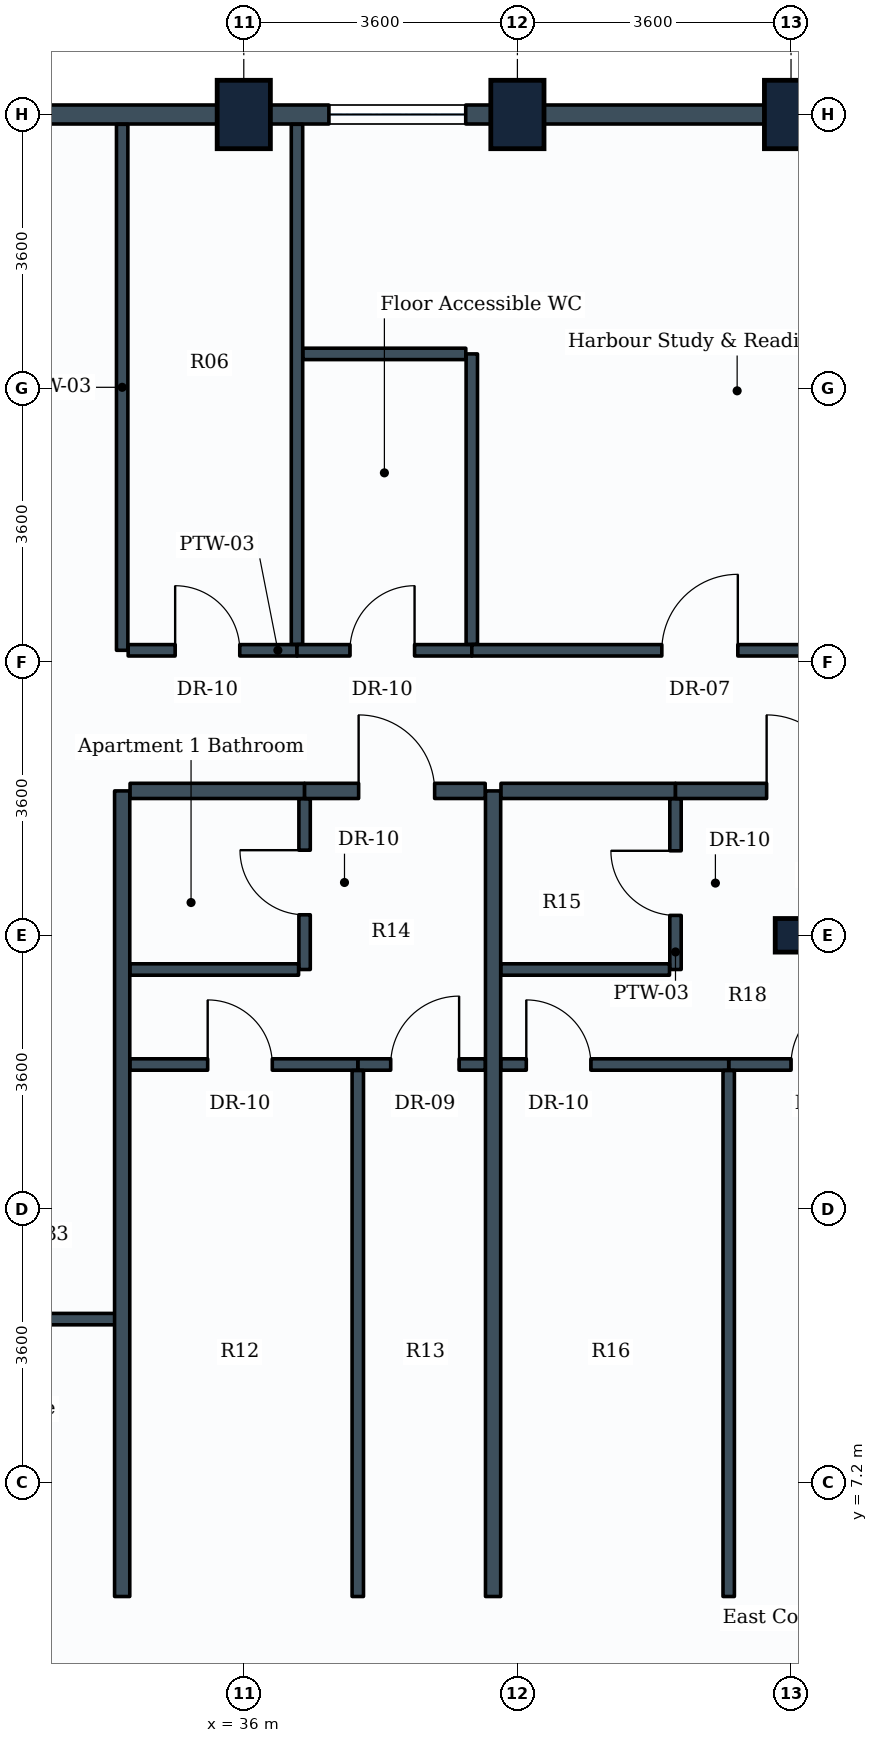
"""IFC4 building model, lengths in metres.
Left out: names, types, materials, properties, quantities, classifications, styles, units other than length and angle.
Written with IfcOpenShell. Run it as: python <this file> out.ifc"""

import sys

from ifc_helpers import new_model, si_unit, direction, frame, frame_2d, origin, origin_2d, place, context, subcontext, project, spatial, rectangle, i_section, extrude, element, fill, save


model = new_model("IFC4")
c1 = context("Model", 3, precision=1e-05, world=origin(), true_north=direction((0.0, 1.0)))
c2 = subcontext(c1, "Body", "Model", "MODEL_VIEW")
j1 = project(units=[si_unit("LENGTHUNIT", "METRE"), si_unit("PLANEANGLEUNIT", "RADIAN")], contexts=[c1])
p1 = place(None, origin())
s1 = spatial("IfcSite", under=j1, at=p1, CompositionType="ELEMENT")
p2 = place(p1, origin())
s2 = spatial("IfcBuilding", under=s1, at=p2, CompositionType="ELEMENT")
p3 = place(p2, frame((0.0, 0.0, 174.8)))
s3 = spatial("IfcBuildingStorey", under=s2, at=p3, CompositionType="ELEMENT", Elevation=174.8)
for number, where, z_axis, x_axis in (
    (1, (36.0, 25.2, 0.0), (0.0, 0.0, 1.0), (1.0, 0.0, 0.0)),
    (2, (39.6, 25.2, 0.0), (0.0, 0.0, 1.0), (1.0, 0.0, 0.0)),
):
    element("IfcColumn", number, at=place(p3, frame(where, z_axis=z_axis, x_axis=x_axis)), inside=s3, PredefinedType="COLUMN", context=c2, shape_type="SweptSolid", body=[
        extrude(rectangle(XDim=0.7, YDim=0.9, at=origin_2d()), origin(), (0.0, 0.0, 1.0), 3.8),
    ])
p4 = place(p3, frame((43.2, 14.4, 0.0), z_axis=(0.0, 0.0, 1.0), x_axis=(1.0, 0.0, 0.0)))
e3 = element("IfcColumn", 3, at=p4, inside=s3, PredefinedType="COLUMN", context=c2, shape_type="SweptSolid", body=[
    extrude(i_section(OverallWidth=0.416, OverallDepth=0.442, WebThickness=0.025, FlangeThickness=0.041, FilletRadius=0.015, at=origin_2d()), origin(), (0.0, 0.0, 1.0), 3.8),
])
p5 = place(p3, frame((43.2, 25.2, 0.0), z_axis=(0.0, 0.0, 1.0), x_axis=(1.0, 0.0, 0.0)))
e4 = element("IfcColumn", 4, at=p5, inside=s3, PredefinedType="COLUMN", context=c2, shape_type="SweptSolid", body=[
    extrude(rectangle(XDim=0.7, YDim=0.9, at=origin_2d()), origin(), (0.0, 0.0, 1.0), 3.8),
])
p6 = place(p3, frame((43.2, 25.2, 0.0), z_axis=(0.0, 0.0, 1.0), x_axis=(1.0, 0.0, 0.0)))
e5 = element("IfcWall", 5, at=p6, inside=s3, PredefinedType="STANDARD", context=c2, shape_type="SweptSolid", body=[
    extrude(rectangle(XDim=3.6, YDim=0.25, at=frame_2d((1.8, 0.0))), origin(), (0.0, 0.0, 1.0), 2.93),
])
p7 = place(p3, frame((39.6, 25.2, 0.0), z_axis=(0.0, 0.0, 1.0), x_axis=(1.0, 0.0, 0.0)))
e6 = element("IfcWall", 6, at=p7, inside=s3, PredefinedType="STANDARD", context=c2, shape_type="SweptSolid", body=[
    extrude(rectangle(XDim=3.6, YDim=0.25, at=frame_2d((1.8, 0.0))), origin(), (0.0, 0.0, 1.0), 2.93),
])
p8 = place(p3, frame((36.0, 25.2, 0.0), z_axis=(0.0, 0.0, 1.0), x_axis=(1.0, 0.0, 0.0)))
e7 = element("IfcWall", 7, at=p8, inside=s3, PredefinedType="STANDARD", context=c2, shape_type="SweptSolid", body=[
    extrude(rectangle(XDim=3.6, YDim=0.25, at=frame_2d((1.8, 0.0))), origin(), (0.0, 0.0, 1.0), 2.93),
])
p9 = place(p8, frame((1.12, 0.0, 0.85)))
e8 = element("IfcOpeningElement", 8, at=p9, cuts=e7, PredefinedType="OPENING", context=c2, shape_type="SweptSolid", body=[
    extrude(rectangle(XDim=1.8, YDim=1.35, at=frame_2d((0.9, 0.675))), frame((0.0, 0.135, 0.0), z_axis=(0.0, -1.0, 0.0), x_axis=(1.0, 0.0, 0.0)), (0.0, 0.0, 1.0), 0.27),
])
p10 = place(p3, frame((32.4, 25.2, 0.0), z_axis=(0.0, 0.0, 1.0), x_axis=(1.0, 0.0, 0.0)))
e9 = element("IfcWall", 9, at=p10, inside=s3, PredefinedType="STANDARD", context=c2, shape_type="SweptSolid", body=[
    extrude(rectangle(XDim=3.6, YDim=0.25, at=frame_2d((1.8, 0.0))), origin(), (0.0, 0.0, 1.0), 2.93),
])
p11 = place(p3, frame((34.4, 18.15, 0.0), z_axis=(0.0, 0.0, 1.0), x_axis=(0.0, 1.0, 0.0)))
e10 = element("IfcWall", 10, at=p11, inside=s3, PredefinedType="PARTITIONING", context=c2, shape_type="SweptSolid", body=[
    extrude(rectangle(XDim=6.921, YDim=0.15, at=frame_2d((3.46, 0.0))), origin(), (0.0, 0.0, 1.0), 2.93),
])
p12 = place(p3, frame((34.479, 18.15, 0.0), z_axis=(0.0, 0.0, 1.0), x_axis=(1.0, 0.0, 0.0)))
e11 = element("IfcWall", 11, at=p12, inside=s3, PredefinedType="PARTITIONING", context=c2, shape_type="SweptSolid", body=[
    extrude(rectangle(XDim=2.221, YDim=0.15, at=frame_2d((1.11, 0.0))), origin(), (0.0, 0.0, 1.0), 3.2),
])
p13 = place(p12, frame((0.618, 0.0, 0.0)))
e12 = element("IfcOpeningElement", 12, at=p13, cuts=e11, PredefinedType="OPENING", context=c2, shape_type="SweptSolid", body=[
    extrude(rectangle(XDim=0.85, YDim=2.1, at=frame_2d((0.425, 1.05))), frame((0.0, 0.085, 0.0), z_axis=(0.0, -1.0, 0.0), x_axis=(1.0, 0.0, 0.0)), (0.0, 0.0, 1.0), 0.17),
])
p14 = place(p3, frame((36.7, 18.229, 0.0), z_axis=(0.0, 0.0, 1.0), x_axis=(0.0, 1.0, 0.0)))
e13 = element("IfcWall", 13, at=p14, inside=s3, PredefinedType="PARTITIONING", context=c2, shape_type="SweptSolid", body=[
    extrude(rectangle(XDim=6.842, YDim=0.15, at=frame_2d((3.421, 0.0))), origin(), (0.0, 0.0, 1.0), 2.93),
])
p15 = place(p3, frame((36.7, 18.15, 0.0), z_axis=(0.0, 0.0, 1.0), x_axis=(1.0, 0.0, 0.0)))
e14 = element("IfcWall", 14, at=p15, inside=s3, PredefinedType="PARTITIONING", context=c2, shape_type="SweptSolid", body=[
    extrude(rectangle(XDim=2.3, YDim=0.15, at=frame_2d((1.15, 0.0))), origin(), (0.0, 0.0, 1.0), 3.2),
])
p16 = place(p15, frame((0.697, 0.0, 0.0)))
e15 = element("IfcOpeningElement", 15, at=p16, cuts=e14, PredefinedType="OPENING", context=c2, shape_type="SweptSolid", body=[
    extrude(rectangle(XDim=0.85, YDim=2.1, at=frame_2d((0.425, 1.05))), frame((0.0, 0.085, 0.0), z_axis=(0.0, -1.0, 0.0), x_axis=(1.0, 0.0, 0.0)), (0.0, 0.0, 1.0), 0.17),
])
p17 = place(p3, frame((39.0, 18.229, 0.0), z_axis=(0.0, 0.0, 1.0), x_axis=(0.0, 1.0, 0.0)))
e16 = element("IfcWall", 16, at=p17, inside=s3, PredefinedType="PARTITIONING", context=c2, shape_type="SweptSolid", body=[
    extrude(rectangle(XDim=3.821, YDim=0.15, at=frame_2d((1.911, 0.0))), origin(), (0.0, 0.0, 1.0), 3.17),
])
p18 = place(p3, frame((36.779, 22.05, 0.0), z_axis=(0.0, 0.0, 1.0), x_axis=(1.0, 0.0, 0.0)))
e17 = element("IfcWall", 17, at=p18, inside=s3, PredefinedType="PARTITIONING", context=c2, shape_type="SweptSolid", body=[
    extrude(rectangle(XDim=2.142, YDim=0.15, at=frame_2d((1.071, 0.0))), origin(), (0.0, 0.0, 1.0), 3.535),
])
p19 = place(p3, frame((28.879, 9.35, 0.0), z_axis=(0.0, 0.0, 1.0), x_axis=(1.0, 0.0, 0.0)))
e18 = element("IfcWall", 18, at=p19, inside=s3, PredefinedType="PARTITIONING", context=c2, shape_type="SweptSolid", body=[
    extrude(rectangle(XDim=5.521, YDim=0.15, at=frame_2d((2.76, 0.0))), origin(), (0.0, 0.0, 1.0), 3.535),
])
p20 = place(p19, frame((0.36, 0.0, 0.0)))
e19 = element("IfcOpeningElement", 19, at=p20, cuts=e18, PredefinedType="OPENING", context=c2, shape_type="SweptSolid", body=[
    extrude(rectangle(XDim=1.0, YDim=2.1, at=frame_2d((0.5, 1.05))), frame((0.0, 0.085, 0.0), z_axis=(0.0, -1.0, 0.0), x_axis=(1.0, 0.0, 0.0)), (0.0, 0.0, 1.0), 0.17),
])
for number, where, z_axis, x_axis in (
    (20, (34.4, 5.7, 0.0), (0.0, 0.0, 1.0), (0.0, 1.0, 0.0)),
    (21, (39.28, 5.7, 0.0), (0.0, 0.0, 1.0), (0.0, 1.0, 0.0)),
):
    element("IfcWall", number, at=place(p3, frame(where, z_axis=z_axis, x_axis=x_axis)), inside=s3, PredefinedType="PARTITIONING", context=c2, shape_type="SweptSolid", body=[
        extrude(rectangle(XDim=10.6, YDim=0.2, at=frame_2d((5.3, 0.0))), origin(), (0.0, 0.0, 1.0), 3.17),
    ])
p21 = place(p3, frame((34.504, 16.3, 0.0), z_axis=(0.0, 0.0, 1.0), x_axis=(1.0, 0.0, 0.0)))
e22 = element("IfcWall", 22, at=p21, inside=s3, PredefinedType="PARTITIONING", context=c2, shape_type="SweptSolid", body=[
    extrude(rectangle(XDim=2.296, YDim=0.2, at=frame_2d((1.148, 0.0))), origin(), (0.0, 0.0, 1.0), 3.22),
])
p22 = place(p3, frame((36.8, 13.95, 0.0), z_axis=(0.0, 0.0, 1.0), x_axis=(0.0, 1.0, 0.0)))
e23 = element("IfcWall", 23, at=p22, inside=s3, PredefinedType="PARTITIONING", context=c2, shape_type="SweptSolid", body=[
    extrude(rectangle(XDim=2.246, YDim=0.15, at=frame_2d((1.123, 0.0))), origin(), (0.0, 0.0, 1.0), 3.17),
])
p23 = place(p22, frame((0.72, 0.0, 0.0)))
e24 = element("IfcOpeningElement", 24, at=p23, cuts=e23, PredefinedType="OPENING", context=c2, shape_type="SweptSolid", body=[
    extrude(rectangle(XDim=0.85, YDim=2.1, at=frame_2d((0.425, 1.05))), frame((0.0, 0.085, 0.0), z_axis=(0.0, -1.0, 0.0), x_axis=(1.0, 0.0, 0.0)), (0.0, 0.0, 1.0), 0.17),
])
p24 = place(p3, frame((34.504, 13.95, 0.0), z_axis=(0.0, 0.0, 1.0), x_axis=(1.0, 0.0, 0.0)))
e25 = element("IfcWall", 25, at=p24, inside=s3, PredefinedType="PARTITIONING", context=c2, shape_type="SweptSolid", body=[
    extrude(rectangle(XDim=2.217, YDim=0.15, at=frame_2d((1.108, 0.0))), origin(), (0.0, 0.0, 1.0), 3.22),
])
p25 = place(p3, frame((36.8, 16.3, 0.0), z_axis=(0.0, 0.0, 1.0), x_axis=(1.0, 0.0, 0.0)))
e26 = element("IfcWall", 26, at=p25, inside=s3, PredefinedType="PARTITIONING", context=c2, shape_type="SweptSolid", body=[
    extrude(rectangle(XDim=2.376, YDim=0.2, at=frame_2d((1.188, 0.0))), origin(), (0.0, 0.0, 1.0), 3.535),
])
p26 = place(p25, frame((0.711, 0.0, 0.0)))
e27 = element("IfcOpeningElement", 27, at=p26, cuts=e26, PredefinedType="OPENING", context=c2, shape_type="SweptSolid", body=[
    extrude(rectangle(XDim=1.0, YDim=2.1, at=frame_2d((0.5, 1.05))), frame((0.0, 0.11, 0.0), z_axis=(0.0, -1.0, 0.0), x_axis=(1.0, 0.0, 0.0)), (0.0, 0.0, 1.0), 0.22),
])
p27 = place(p3, frame((37.5, 12.7, 0.0), z_axis=(0.0, 0.0, 1.0), x_axis=(1.0, 0.0, 0.0)))
e28 = element("IfcWall", 28, at=p27, inside=s3, PredefinedType="PARTITIONING", context=c2, shape_type="SweptSolid", body=[
    extrude(rectangle(XDim=1.676, YDim=0.15, at=frame_2d((0.838, 0.0))), origin(), (0.0, 0.0, 1.0), 3.535),
])
p28 = place(p27, frame((0.433, 0.0, 0.0)))
e29 = element("IfcOpeningElement", 29, at=p28, cuts=e28, PredefinedType="OPENING", context=c2, shape_type="SweptSolid", body=[
    extrude(rectangle(XDim=0.9, YDim=2.1, at=frame_2d((0.45, 1.05))), frame((0.0, 0.085, 0.0), z_axis=(0.0, -1.0, 0.0), x_axis=(1.0, 0.0, 0.0)), (0.0, 0.0, 1.0), 0.17),
])
p29 = place(p3, frame((34.504, 12.7, 0.0), z_axis=(0.0, 0.0, 1.0), x_axis=(1.0, 0.0, 0.0)))
e30 = element("IfcWall", 30, at=p29, inside=s3, PredefinedType="PARTITIONING", context=c2, shape_type="SweptSolid", body=[
    extrude(rectangle(XDim=2.996, YDim=0.15, at=frame_2d((1.498, 0.0))), origin(), (0.0, 0.0, 1.0), 3.22),
])
p30 = place(p29, frame((1.021, 0.0, 0.0)))
e31 = element("IfcOpeningElement", 31, at=p30, cuts=e30, PredefinedType="OPENING", context=c2, shape_type="SweptSolid", body=[
    extrude(rectangle(XDim=0.85, YDim=2.1, at=frame_2d((0.425, 1.05))), frame((0.0, 0.085, 0.0), z_axis=(0.0, -1.0, 0.0), x_axis=(1.0, 0.0, 0.0)), (0.0, 0.0, 1.0), 0.17),
])
p31 = place(p3, frame((37.5, 5.7, 0.0), z_axis=(0.0, 0.0, 1.0), x_axis=(0.0, 1.0, 0.0)))
e32 = element("IfcWall", 32, at=p31, inside=s3, PredefinedType="PARTITIONING", context=c2, shape_type="SweptSolid", body=[
    extrude(rectangle(XDim=6.921, YDim=0.15, at=frame_2d((3.46, 0.0))), origin(), (0.0, 0.0, 1.0), 3.17),
])
p32 = place(p3, frame((39.384, 16.3, 0.0), z_axis=(0.0, 0.0, 1.0), x_axis=(1.0, 0.0, 0.0)))
e33 = element("IfcWall", 33, at=p32, inside=s3, PredefinedType="PARTITIONING", context=c2, shape_type="SweptSolid", body=[
    extrude(rectangle(XDim=2.296, YDim=0.2, at=frame_2d((1.148, 0.0))), origin(), (0.0, 0.0, 1.0), 3.17),
])
p33 = place(p3, frame((41.68, 13.95, 0.0), z_axis=(0.0, 0.0, 1.0), x_axis=(0.0, 1.0, 0.0)))
e34 = element("IfcWall", 34, at=p33, inside=s3, PredefinedType="PARTITIONING", context=c2, shape_type="SweptSolid", body=[
    extrude(rectangle(XDim=2.246, YDim=0.15, at=frame_2d((1.123, 0.0))), origin(), (0.0, 0.0, 1.0), 3.17),
])
p34 = place(p33, frame((0.712, 0.0, 0.0)))
e35 = element("IfcOpeningElement", 35, at=p34, cuts=e34, PredefinedType="OPENING", context=c2, shape_type="SweptSolid", body=[
    extrude(rectangle(XDim=0.85, YDim=2.1, at=frame_2d((0.425, 1.05))), frame((0.0, 0.085, 0.0), z_axis=(0.0, -1.0, 0.0), x_axis=(1.0, 0.0, 0.0)), (0.0, 0.0, 1.0), 0.17),
])
p35 = place(p3, frame((39.384, 13.95, 0.0), z_axis=(0.0, 0.0, 1.0), x_axis=(1.0, 0.0, 0.0)))
e36 = element("IfcWall", 36, at=p35, inside=s3, PredefinedType="PARTITIONING", context=c2, shape_type="SweptSolid", body=[
    extrude(rectangle(XDim=2.217, YDim=0.15, at=frame_2d((1.108, 0.0))), origin(), (0.0, 0.0, 1.0), 3.17),
])
p36 = place(p3, frame((41.68, 16.3, 0.0), z_axis=(0.0, 0.0, 1.0), x_axis=(1.0, 0.0, 0.0)))
e37 = element("IfcWall", 37, at=p36, inside=s3, PredefinedType="PARTITIONING", context=c2, shape_type="SweptSolid", body=[
    extrude(rectangle(XDim=3.32, YDim=0.2, at=frame_2d((1.66, 0.0))), origin(), (0.0, 0.0, 1.0), 3.18),
])
p37 = place(p36, frame((1.199, 0.0, 0.0)))
e38 = element("IfcOpeningElement", 38, at=p37, cuts=e37, PredefinedType="OPENING", context=c2, shape_type="SweptSolid", body=[
    extrude(rectangle(XDim=1.0, YDim=2.1, at=frame_2d((0.5, 1.05))), frame((0.0, 0.11, 0.0), z_axis=(0.0, -1.0, 0.0), x_axis=(1.0, 0.0, 0.0)), (0.0, 0.0, 1.0), 0.22),
])
p38 = place(p3, frame((42.38, 12.7, 0.0), z_axis=(0.0, 0.0, 1.0), x_axis=(1.0, 0.0, 0.0)))
e39 = element("IfcWall", 39, at=p38, inside=s3, PredefinedType="PARTITIONING", context=c2, shape_type="SweptSolid", body=[
    extrude(rectangle(XDim=2.62, YDim=0.15, at=frame_2d((1.31, 0.0))), origin(), (0.0, 0.0, 1.0), 3.18),
])
p39 = place(p38, frame((0.82, 0.0, 0.0)))
e40 = element("IfcOpeningElement", 40, at=p39, cuts=e39, PredefinedType="OPENING", context=c2, shape_type="SweptSolid", body=[
    extrude(rectangle(XDim=0.9, YDim=2.1, at=frame_2d((0.45, 1.05))), frame((0.0, 0.085, 0.0), z_axis=(0.0, -1.0, 0.0), x_axis=(1.0, 0.0, 0.0)), (0.0, 0.0, 1.0), 0.17),
])
p40 = place(p3, frame((39.384, 12.7, 0.0), z_axis=(0.0, 0.0, 1.0), x_axis=(1.0, 0.0, 0.0)))
e41 = element("IfcWall", 41, at=p40, inside=s3, PredefinedType="PARTITIONING", context=c2, shape_type="SweptSolid", body=[
    extrude(rectangle(XDim=2.996, YDim=0.15, at=frame_2d((1.498, 0.0))), origin(), (0.0, 0.0, 1.0), 3.17),
])
p41 = place(p40, frame((0.333, 0.0, 0.0)))
e42 = element("IfcOpeningElement", 42, at=p41, cuts=e41, PredefinedType="OPENING", context=c2, shape_type="SweptSolid", body=[
    extrude(rectangle(XDim=0.85, YDim=2.1, at=frame_2d((0.425, 1.05))), frame((0.0, 0.085, 0.0), z_axis=(0.0, -1.0, 0.0), x_axis=(1.0, 0.0, 0.0)), (0.0, 0.0, 1.0), 0.17),
])
p42 = place(p3, frame((42.38, 5.7, 0.0), z_axis=(0.0, 0.0, 1.0), x_axis=(0.0, 1.0, 0.0)))
e43 = element("IfcWall", 43, at=p42, inside=s3, PredefinedType="PARTITIONING", context=c2, shape_type="SweptSolid", body=[
    extrude(rectangle(XDim=6.921, YDim=0.15, at=frame_2d((3.46, 0.0))), origin(), (0.0, 0.0, 1.0), 3.17),
])
p43 = place(p3, frame((39.0, 18.15, 0.0), z_axis=(0.0, 0.0, 1.0), x_axis=(1.0, 0.0, 0.0)))
e44 = element("IfcWall", 44, at=p43, inside=s3, PredefinedType="PARTITIONING", context=c2, shape_type="SweptSolid", body=[
    extrude(rectangle(XDim=6.0, YDim=0.15, at=frame_2d((3.0, 0.0))), origin(), (0.0, 0.0, 1.0), 3.17),
])
p44 = place(p43, frame((2.5, 0.0, 0.0)))
e45 = element("IfcOpeningElement", 45, at=p44, cuts=e44, PredefinedType="OPENING", context=c2, shape_type="SweptSolid", body=[
    extrude(rectangle(XDim=1.0, YDim=2.1, at=frame_2d((0.5, 1.05))), frame((0.0, 0.085, 0.0), z_axis=(0.0, -1.0, 0.0), x_axis=(1.0, 0.0, 0.0)), (0.0, 0.0, 1.0), 0.17),
])
p45 = place(p9, origin())
e46 = element("IfcWindow", 46, at=p45, inside=s3, PartitioningType="SINGLE_PANEL", PredefinedType="WINDOW", context=c2, shape_type="SweptSolid", body=[
    extrude(rectangle(XDim=1.8, YDim=1.35, at=frame_2d((0.9, 0.675))), frame((0.0, 0.03, 0.0), z_axis=(0.0, -1.0, 0.0), x_axis=(1.0, 0.0, 0.0)), (0.0, 0.0, 1.0), 0.06),
])
fill(e8, e46)
p46 = place(p13, origin())
e47 = element("IfcDoor", 47, at=p46, inside=s3, OperationType="SINGLE_SWING_LEFT", PredefinedType="DOOR", context=c2, shape_type="SweptSolid", body=[
    extrude(rectangle(XDim=0.85, YDim=2.1, at=frame_2d((0.425, 1.05))), frame((0.0, 0.025, 0.0), z_axis=(0.0, -1.0, 0.0), x_axis=(1.0, 0.0, 0.0)), (0.0, 0.0, 1.0), 0.05),
])
fill(e12, e47)
p47 = place(p16, origin())
e48 = element("IfcDoor", 48, at=p47, inside=s3, OperationType="SINGLE_SWING_RIGHT", PredefinedType="DOOR", context=c2, shape_type="SweptSolid", body=[
    extrude(rectangle(XDim=0.85, YDim=2.1, at=frame_2d((0.425, 1.05))), frame((0.0, 0.025, 0.0), z_axis=(0.0, -1.0, 0.0), x_axis=(1.0, 0.0, 0.0)), (0.0, 0.0, 1.0), 0.05),
])
fill(e15, e48)
p48 = place(p23, origin())
e49 = element("IfcDoor", 49, at=p48, inside=s3, OperationType="SINGLE_SWING_RIGHT", PredefinedType="DOOR", context=c2, shape_type="SweptSolid", body=[
    extrude(rectangle(XDim=0.85, YDim=2.1, at=frame_2d((0.425, 1.05))), frame((0.0, 0.025, 0.0), z_axis=(0.0, -1.0, 0.0), x_axis=(1.0, 0.0, 0.0)), (0.0, 0.0, 1.0), 0.05),
])
fill(e24, e49)
p49 = place(p26, origin())
e50 = element("IfcDoor", 50, at=p49, inside=s3, OperationType="SINGLE_SWING_LEFT", PredefinedType="DOOR", context=c2, shape_type="SweptSolid", body=[
    extrude(rectangle(XDim=1.0, YDim=2.1, at=frame_2d((0.5, 1.05))), frame((0.0, 0.025, 0.0), z_axis=(0.0, -1.0, 0.0), x_axis=(1.0, 0.0, 0.0)), (0.0, 0.0, 1.0), 0.05),
])
fill(e27, e50)
p50 = place(p28, origin())
e51 = element("IfcDoor", 51, at=p50, inside=s3, OperationType="SINGLE_SWING_RIGHT", PredefinedType="DOOR", context=c2, shape_type="SweptSolid", body=[
    extrude(rectangle(XDim=0.9, YDim=2.1, at=frame_2d((0.45, 1.05))), frame((0.0, 0.025, 0.0), z_axis=(0.0, -1.0, 0.0), x_axis=(1.0, 0.0, 0.0)), (0.0, 0.0, 1.0), 0.05),
])
fill(e29, e51)
p51 = place(p30, origin())
e52 = element("IfcDoor", 52, at=p51, inside=s3, OperationType="SINGLE_SWING_LEFT", PredefinedType="DOOR", context=c2, shape_type="SweptSolid", body=[
    extrude(rectangle(XDim=0.85, YDim=2.1, at=frame_2d((0.425, 1.05))), frame((0.0, 0.025, 0.0), z_axis=(0.0, -1.0, 0.0), x_axis=(1.0, 0.0, 0.0)), (0.0, 0.0, 1.0), 0.05),
])
fill(e31, e52)
p52 = place(p34, origin())
e53 = element("IfcDoor", 53, at=p52, inside=s3, OperationType="SINGLE_SWING_RIGHT", PredefinedType="DOOR", context=c2, shape_type="SweptSolid", body=[
    extrude(rectangle(XDim=0.85, YDim=2.1, at=frame_2d((0.425, 1.05))), frame((0.0, 0.025, 0.0), z_axis=(0.0, -1.0, 0.0), x_axis=(1.0, 0.0, 0.0)), (0.0, 0.0, 1.0), 0.05),
])
fill(e35, e53)
p53 = place(p37, origin())
e54 = element("IfcDoor", 54, at=p53, inside=s3, OperationType="SINGLE_SWING_LEFT", PredefinedType="DOOR", context=c2, shape_type="SweptSolid", body=[
    extrude(rectangle(XDim=1.0, YDim=2.1, at=frame_2d((0.5, 1.05))), frame((0.0, 0.025, 0.0), z_axis=(0.0, -1.0, 0.0), x_axis=(1.0, 0.0, 0.0)), (0.0, 0.0, 1.0), 0.05),
])
fill(e38, e54)
p54 = place(p39, origin())
e55 = element("IfcDoor", 55, at=p54, inside=s3, OperationType="SINGLE_SWING_RIGHT", PredefinedType="DOOR", context=c2, shape_type="SweptSolid", body=[
    extrude(rectangle(XDim=0.9, YDim=2.1, at=frame_2d((0.45, 1.05))), frame((0.0, 0.025, 0.0), z_axis=(0.0, -1.0, 0.0), x_axis=(1.0, 0.0, 0.0)), (0.0, 0.0, 1.0), 0.05),
])
fill(e40, e55)
p55 = place(p41, origin())
e56 = element("IfcDoor", 56, at=p55, inside=s3, OperationType="SINGLE_SWING_LEFT", PredefinedType="DOOR", context=c2, shape_type="SweptSolid", body=[
    extrude(rectangle(XDim=0.85, YDim=2.1, at=frame_2d((0.425, 1.05))), frame((0.0, 0.025, 0.0), z_axis=(0.0, -1.0, 0.0), x_axis=(1.0, 0.0, 0.0)), (0.0, 0.0, 1.0), 0.05),
])
fill(e42, e56)
p56 = place(p44, origin())
e57 = element("IfcDoor", 57, at=p56, inside=s3, OperationType="SINGLE_SWING_RIGHT", PredefinedType="DOOR", context=c2, shape_type="SweptSolid", body=[
    extrude(rectangle(XDim=1.0, YDim=2.1, at=frame_2d((0.5, 1.05))), frame((0.0, 0.025, 0.0), z_axis=(0.0, -1.0, 0.0), x_axis=(1.0, 0.0, 0.0)), (0.0, 0.0, 1.0), 0.05),
])
fill(e45, e57)
save(model, sys.argv[1])
